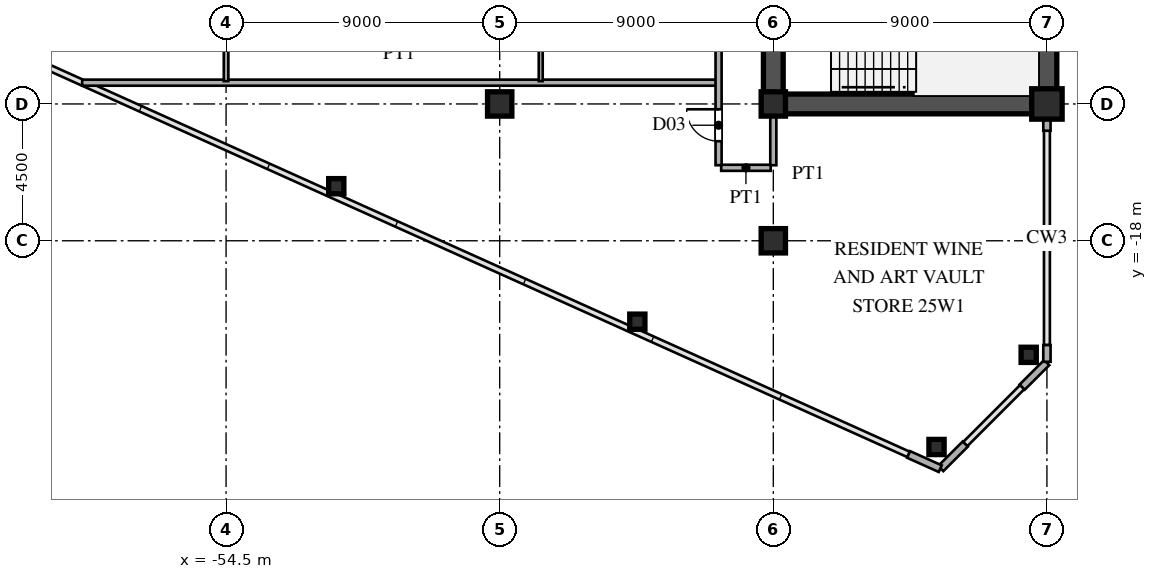
"""IFC4 building model, lengths in metres.
Left out: names, types, materials, properties, quantities, classifications, styles, units other than length and angle.
Written with IfcOpenShell. Run it as: python <this file> out.ifc"""

import sys

from ifc_helpers import new_model, si_unit, direction, frame, frame_2d, origin, origin_2d, place, context, subcontext, project, spatial, rectangle, hollow_rectangle, i_section, extrude, source, transform, mapped, element, fill, save


model = new_model("IFC4")
c1 = context("Model", 3, precision=1e-05, world=origin(), true_north=direction((0.0, 1.0)))
c2 = subcontext(c1, "Body", "Model", "MODEL_VIEW")
j1 = project(units=[si_unit("LENGTHUNIT", "METRE"), si_unit("PLANEANGLEUNIT", "RADIAN")], contexts=[c1])
p1 = place(None, origin())
s1 = spatial("IfcSite", under=j1, at=p1, CompositionType="ELEMENT")
p2 = place(p1, origin())
s2 = spatial("IfcBuilding", under=s1, at=p2, CompositionType="ELEMENT")
p3 = place(p2, frame((0.0, 0.0, 96.0)))
s3 = spatial("IfcBuildingStorey", under=s2, at=p3, CompositionType="ELEMENT", Elevation=96.0)
m1 = source(origin(), c2, "Body", "SweptSolid", [
    extrude(hollow_rectangle(XDim=1.0, YDim=1.0, WallThickness=0.042, at=origin_2d()), origin(), (0.0, 0.0, 1.0), 3.6),
])
p4 = place(p3, frame((-27.5, -13.5, 0.0), z_axis=(0.0, 0.0, 1.0), x_axis=(1.0, 0.0, 0.0)))
e1 = element("IfcColumn", 1, at=p4, inside=s3, PredefinedType="COLUMN", context=c2, shape_type="MappedRepresentation", body=[
    mapped(m1, transform((0.0, 0.0, 0.0), scale=1.0)),
])
m2 = source(origin(), c2, "Body", "SweptSolid", [
    extrude(i_section(OverallWidth=0.8, OverallDepth=0.8, WebThickness=0.032, FlangeThickness=0.05, at=origin_2d()), origin(), (0.0, 0.0, 1.0), 3.6),
])
for number, where, z_axis, x_axis in (
    (2, (-36.5, -18.0, 0.0), (0.0, 0.0, 1.0), (1.0, 0.0, 0.0)),
    (3, (-36.5, -13.5, 0.0), (0.0, 0.0, 1.0), (1.0, 0.0, 0.0)),
    (4, (-45.5, -13.5, 0.0), (0.0, 0.0, 1.0), (1.0, 0.0, 0.0)),
):
    element("IfcColumn", number, at=place(p3, frame(where, z_axis=z_axis, x_axis=x_axis)), inside=s3, PredefinedType="COLUMN", context=c2, shape_type="MappedRepresentation", body=[
        mapped(m2, transform((0.0, 0.0, 0.0), scale=1.0)),
    ])
m3 = source(origin(), c2, "Body", "SweptSolid", [
    extrude(hollow_rectangle(XDim=0.5, YDim=0.5, WallThickness=0.02, at=origin_2d()), origin(), (0.0, 0.0, 1.0), 3.6),
])
for number, where, z_axis, x_axis in (
    (5, (-28.1, -21.751, 0.0), (0.0, 0.0, 1.0), (1.0, 0.0, 0.0)),
    (6, (-31.131, -24.783, 0.0), (0.0, 0.0, 1.0), (1.0, 0.0, 0.0)),
    (7, (-40.973, -20.661, 0.0), (0.0, 0.0, 1.0), (1.0, 0.0, 0.0)),
    (8, (-50.875, -16.205, 0.0), (0.0, 0.0, 1.0), (1.0, 0.0, 0.0)),
):
    element("IfcColumn", number, at=place(p3, frame(where, z_axis=z_axis, x_axis=x_axis)), inside=s3, PredefinedType="COLUMN", context=c2, shape_type="MappedRepresentation", body=[
        mapped(m3, transform((0.0, 0.0, 0.0), scale=1.0)),
    ])
p5 = place(p3, frame((-27.5, -21.98, 0.0), z_axis=(0.0, 0.0, 1.0), x_axis=(0.0, 1.0, 0.0)))
e9 = element("IfcWall", 9, at=p5, inside=s3, PredefinedType="SOLIDWALL", context=c2, shape_type="SweptSolid", body=[
    extrude(rectangle(XDim=0.55, YDim=0.24, at=frame_2d((0.275, 0.0))), origin(), (0.0, 0.0, 1.0), 3.38),
])
p6 = place(p3, frame((-27.5, -14.38, 0.0), z_axis=(0.0, 0.0, 1.0), x_axis=(0.0, 1.0, 0.0)))
e10 = element("IfcWall", 10, at=p6, inside=s3, PredefinedType="SOLIDWALL", context=c2, shape_type="SweptSolid", body=[
    extrude(rectangle(XDim=0.55, YDim=0.24, at=frame_2d((0.275, 0.0))), origin(), (0.0, 0.0, 1.0), 2.88),
])
p7 = place(p3, frame((-32.049, -25.028, 0.0), z_axis=(0.0, 0.0, 1.0), x_axis=(0.911929519623, -0.410346866979, 0.0)))
e11 = element("IfcWall", 11, at=p7, inside=s3, PredefinedType="SOLIDWALL", context=c2, shape_type="SweptSolid", body=[
    extrude(rectangle(XDim=1.14, YDim=0.24, at=frame_2d((0.57, 0.0))), origin(), (0.0, 0.0, 1.0), 3.38),
])
for number, where, z_axis, x_axis in (
    (12, (-30.993, -25.493, 0.0), (0.0, 0.0, 1.0), (0.707, 0.707, 0.0)),
    (13, (-28.313, -22.813, 0.0), (0.0, 0.0, 1.0), (0.707, 0.707, 0.0)),
):
    element("IfcWall", number, at=place(p3, frame(where, z_axis=z_axis, x_axis=x_axis)), inside=s3, PredefinedType="SOLIDWALL", context=c2, shape_type="SweptSolid", body=[
        extrude(rectangle(XDim=1.14, YDim=0.24, at=frame_2d((0.57, 0.0))), origin(), (0.0, 0.0, 1.0), 3.38),
    ])
p8 = place(p3, frame((-27.5, -13.5, 0.0), z_axis=(0.0, 0.0, 1.0), x_axis=(0.0, 1.0, 0.0)))
e14 = element("IfcWall", 14, at=p8, inside=s3, PredefinedType="SHEAR", context=c2, shape_type="SweptSolid", body=[
    extrude(rectangle(XDim=12.2, YDim=0.65, at=frame_2d((6.1, 0.0))), origin(), (0.0, 0.0, 1.0), 3.38),
])
p9 = place(p3, frame((-36.5, -13.5, 0.0), z_axis=(0.0, 0.0, 1.0), x_axis=(1.0, 0.0, 0.0)))
e15 = element("IfcWall", 15, at=p9, inside=s3, PredefinedType="SHEAR", context=c2, shape_type="SweptSolid", body=[
    extrude(rectangle(XDim=9.0, YDim=0.65, at=frame_2d((4.5, 0.0))), origin(), (0.0, 0.0, 1.0), 3.38),
])
p10 = place(p3, frame((-36.5, -13.65, 0.0), z_axis=(0.0, 0.0, 1.0), x_axis=(0.0, 1.0, 0.0)))
e16 = element("IfcWall", 16, at=p10, inside=s3, PredefinedType="SHEAR", context=c2, shape_type="SweptSolid", body=[
    extrude(rectangle(XDim=7.15, YDim=0.65, at=frame_2d((3.575, 0.0))), origin(), (0.0, 0.0, 1.0), 3.38),
])
p11 = place(p10, frame((4.675, 0.0, 0.0)))
e17 = element("IfcOpeningElement", 17, at=p11, cuts=e16, PredefinedType="OPENING", context=c2, shape_type="SweptSolid", body=[
    extrude(rectangle(XDim=1.15, YDim=2.2, at=frame_2d((0.575, 1.1))), frame((0.0, 0.335, 0.0), z_axis=(0.0, -1.0, 0.0), x_axis=(1.0, 0.0, 0.0)), (0.0, 0.0, 1.0), 0.67),
])
p12 = place(p3, frame((-38.215, -15.6, 0.0), z_axis=(0.0, 0.0, 1.0), x_axis=(1.0, 0.0, 0.0)))
e18 = element("IfcWall", 18, at=p12, inside=s3, PredefinedType="PARTITIONING", context=c2, shape_type="SweptSolid", body=[
    extrude(rectangle(XDim=1.63, YDim=0.2, at=frame_2d((0.815, 0.0))), origin(), (0.0, 0.0, 1.0), 3.38),
])
p13 = place(p3, frame((-59.234, -12.8, 0.0), z_axis=(0.0, 0.0, 1.0), x_axis=(1.0, 0.0, 0.0)))
e19 = element("IfcWall", 19, at=p13, inside=s3, PredefinedType="PARTITIONING", context=c2, shape_type="SweptSolid", body=[
    extrude(rectangle(XDim=20.854, YDim=0.2, at=frame_2d((10.427, 0.0))), origin(), (0.0, 0.0, 1.0), 3.38),
])
p14 = place(p3, frame((-54.5, -12.75, 0.0), z_axis=(0.0, 0.0, 1.0), x_axis=(0.0, 1.0, 0.0)))
e20 = element("IfcWall", 20, at=p14, inside=s3, PredefinedType="PARTITIONING", context=c2, shape_type="SweptSolid", body=[
    extrude(rectangle(XDim=27.71, YDim=0.15, at=frame_2d((13.855, 0.0))), origin(), (0.0, 0.0, 1.0), 2.68),
])
p15 = place(p14, frame((4.625, 0.0, 0.0)))
e21 = element("IfcOpeningElement", 21, at=p15, cuts=e20, PredefinedType="OPENING", context=c2, shape_type="SweptSolid", body=[
    extrude(rectangle(XDim=0.95, YDim=2.15, at=frame_2d((0.475, 1.075))), frame((0.0, 0.085, 0.0), z_axis=(0.0, -1.0, 0.0), x_axis=(1.0, 0.0, 0.0)), (0.0, 0.0, 1.0), 0.17),
])
p16 = place(p14, frame((1.192, 0.0, 0.0)))
e22 = element("IfcOpeningElement", 22, at=p16, cuts=e20, PredefinedType="OPENING", context=c2, shape_type="SweptSolid", body=[
    extrude(rectangle(XDim=0.95, YDim=2.15, at=frame_2d((0.475, 1.075))), frame((0.0, 0.085, 0.0), z_axis=(0.0, -1.0, 0.0), x_axis=(1.0, 0.0, 0.0)), (0.0, 0.0, 1.0), 0.17),
])
p17 = place(p14, frame((8.717, 0.0, 0.0)))
e23 = element("IfcOpeningElement", 23, at=p17, cuts=e20, PredefinedType="OPENING", context=c2, shape_type="SweptSolid", body=[
    extrude(rectangle(XDim=0.95, YDim=2.15, at=frame_2d((0.475, 1.075))), frame((0.0, 0.085, 0.0), z_axis=(0.0, -1.0, 0.0), x_axis=(1.0, 0.0, 0.0)), (0.0, 0.0, 1.0), 0.17),
])
p18 = place(p14, frame((15.275, 0.0, 0.0)))
e24 = element("IfcOpeningElement", 24, at=p18, cuts=e20, PredefinedType="OPENING", context=c2, shape_type="SweptSolid", body=[
    extrude(rectangle(XDim=0.95, YDim=2.15, at=frame_2d((0.475, 1.075))), frame((0.0, 0.085, 0.0), z_axis=(0.0, -1.0, 0.0), x_axis=(1.0, 0.0, 0.0)), (0.0, 0.0, 1.0), 0.17),
])
p19 = place(p14, frame((25.835, 0.0, 0.0)))
e25 = element("IfcOpeningElement", 25, at=p19, cuts=e20, PredefinedType="OPENING", context=c2, shape_type="SweptSolid", body=[
    extrude(rectangle(XDim=0.95, YDim=2.15, at=frame_2d((0.475, 1.075))), frame((0.0, 0.085, 0.0), z_axis=(0.0, -1.0, 0.0), x_axis=(1.0, 0.0, 0.0)), (0.0, 0.0, 1.0), 0.17),
])
p20 = place(p3, frame((-44.15, -12.75, 0.0), z_axis=(0.0, 0.0, 1.0), x_axis=(0.0, 1.0, 0.0)))
e26 = element("IfcWall", 26, at=p20, inside=s3, PredefinedType="PARTITIONING", context=c2, shape_type="SweptSolid", body=[
    extrude(rectangle(XDim=2.679, YDim=0.13, at=frame_2d((1.339, 0.0))), origin(), (0.0, 0.0, 1.0), 3.38),
])
p21 = place(p3, frame((-38.3, -15.515, 0.0), z_axis=(0.0, 0.0, 1.0), x_axis=(0.0, 1.0, 0.0)))
e27 = element("IfcWall", 27, at=p21, inside=s3, PredefinedType="PARTITIONING", context=c2, shape_type="SweptSolid", body=[
    extrude(rectangle(XDim=31.03, YDim=0.2, at=frame_2d((15.515, 0.0))), origin(), (0.0, 0.0, 1.0), 3.38),
])
p22 = place(p21, frame((0.79, 0.0, 0.0)))
e28 = element("IfcOpeningElement", 28, at=p22, cuts=e27, PredefinedType="OPENING", context=c2, shape_type="SweptSolid", body=[
    extrude(rectangle(XDim=1.05, YDim=2.25, at=frame_2d((0.525, 1.125))), frame((0.0, 0.11, 0.0), z_axis=(0.0, -1.0, 0.0), x_axis=(1.0, 0.0, 0.0)), (0.0, 0.0, 1.0), 0.22),
])
p23 = place(p21, frame((7.186, 0.0, 0.0)))
e29 = element("IfcOpeningElement", 29, at=p23, cuts=e27, PredefinedType="OPENING", context=c2, shape_type="SweptSolid", body=[
    extrude(rectangle(XDim=1.05, YDim=2.25, at=frame_2d((0.525, 1.125))), frame((0.0, 0.11, 0.0), z_axis=(0.0, -1.0, 0.0), x_axis=(1.0, 0.0, 0.0)), (0.0, 0.0, 1.0), 0.22),
])
p24 = place(p21, frame((17.825, 0.0, 0.0)))
e30 = element("IfcOpeningElement", 30, at=p24, cuts=e27, PredefinedType="OPENING", context=c2, shape_type="SweptSolid", body=[
    extrude(rectangle(XDim=1.05, YDim=2.25, at=frame_2d((0.525, 1.125))), frame((0.0, 0.11, 0.0), z_axis=(0.0, -1.0, 0.0), x_axis=(1.0, 0.0, 0.0)), (0.0, 0.0, 1.0), 0.22),
])
p25 = place(p21, frame((27.635, 0.0, 0.0)))
e31 = element("IfcOpeningElement", 31, at=p25, cuts=e27, PredefinedType="OPENING", context=c2, shape_type="SweptSolid", body=[
    extrude(rectangle(XDim=1.05, YDim=2.25, at=frame_2d((0.525, 1.125))), frame((0.0, 0.11, 0.0), z_axis=(0.0, -1.0, 0.0), x_axis=(1.0, 0.0, 0.0)), (0.0, 0.0, 1.0), 0.22),
])
p26 = place(p3, frame((-36.5, -15.515, 0.0), z_axis=(0.0, 0.0, 1.0), x_axis=(0.0, 1.0, 0.0)))
e32 = element("IfcWall", 32, at=p26, inside=s3, PredefinedType="PARTITIONING", context=c2, shape_type="SweptSolid", body=[
    extrude(rectangle(XDim=1.685, YDim=0.2, at=frame_2d((0.842, 0.0))), origin(), (0.0, 0.0, 1.0), 2.68),
])
m4 = source(origin(), c2, "Body", "SweptSolid", [
    extrude(rectangle(XDim=1.05, YDim=2.25, at=frame_2d((0.525, 1.125))), frame((0.0, 0.025, 0.0), z_axis=(0.0, -1.0, 0.0), x_axis=(1.0, 0.0, 0.0)), (0.0, 0.0, 1.0), 0.05),
])
p27 = place(p22, origin())
e33 = element("IfcDoor", 33, at=p27, inside=s3, OperationType="SINGLE_SWING_RIGHT", PredefinedType="DOOR", context=c2, shape_type="MappedRepresentation", body=[
    mapped(m4, transform((0.0, 0.0, 0.0), scale=1.0)),
])
fill(e28, e33)
save(model, sys.argv[1])
